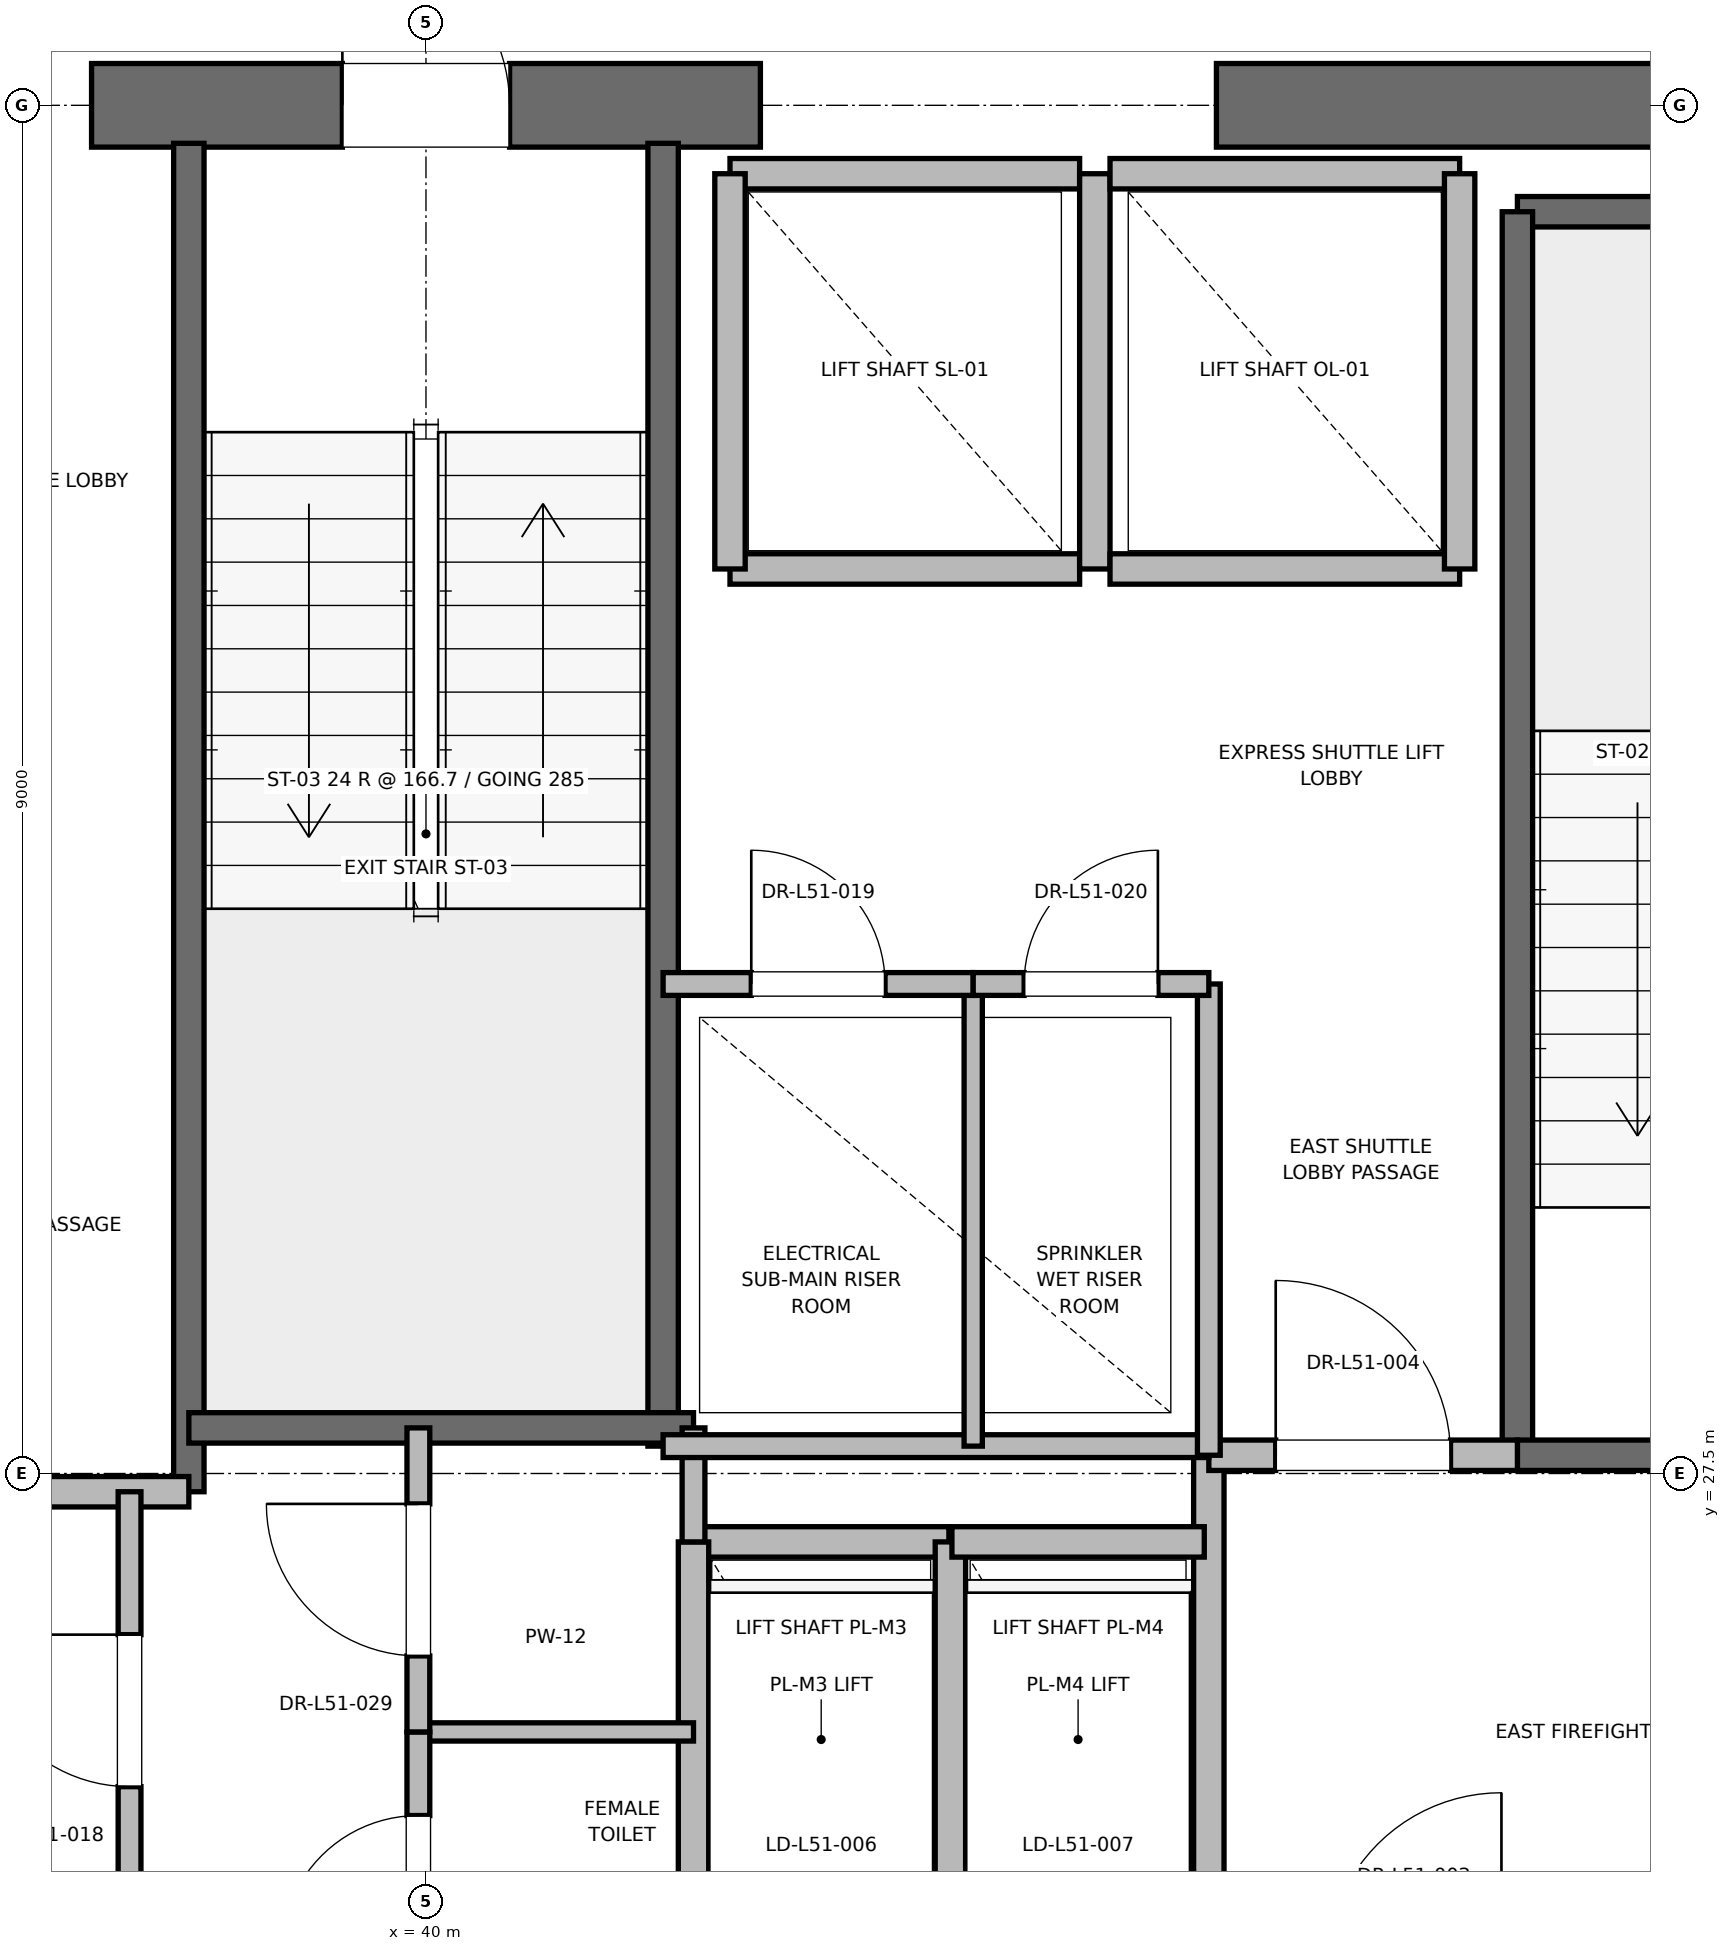
"""IFC4 building model, lengths in metres.
Left out: names, types, materials, properties, quantities, classifications, styles, units other than length and angle.
Written with IfcOpenShell. Run it as: python <this file> out.ifc"""

import sys

from ifc_helpers import new_model, si_unit, direction, frame, frame_2d, origin, place, context, subcontext, project, spatial, rectangle, extrude, element, fill, save


model = new_model("IFC4")
c1 = context("Model", 3, precision=1e-05, world=origin(), true_north=direction((0.0, 1.0)))
c2 = subcontext(c1, "Body", "Model", "MODEL_VIEW")
j1 = project(units=[si_unit("LENGTHUNIT", "METRE"), si_unit("PLANEANGLEUNIT", "RADIAN")], contexts=[c1])
p1 = place(None, origin())
s1 = spatial("IfcSite", under=j1, at=p1, CompositionType="ELEMENT")
p2 = place(p1, origin())
s2 = spatial("IfcBuilding", under=s1, at=p2, CompositionType="ELEMENT")
p3 = place(p2, frame((0.0, 0.0, 221.2)))
s3 = spatial("IfcBuildingStorey", under=s2, at=p3, CompositionType="ELEMENT", Elevation=221.2)
p4 = place(p3, frame((37.8, 36.5, 0.0), z_axis=(0.0, 0.0, 1.0), x_axis=(1.0, 0.0, 0.0)))
e1 = element("IfcWall", 1, at=p4, inside=s3, PredefinedType="SHEAR", context=c2, shape_type="SweptSolid", body=[
    extrude(rectangle(XDim=4.4, YDim=0.55, at=frame_2d((2.2, 0.0))), origin(), (0.0, 0.0, 1.0), 3.775),
])
p5 = place(p4, frame((1.65, 0.0, 0.0)))
e2 = element("IfcOpeningElement", 2, at=p5, cuts=e1, PredefinedType="OPENING", context=c2, shape_type="SweptSolid", body=[
    extrude(rectangle(XDim=1.1, YDim=2.15, at=frame_2d((0.55, 1.075))), frame((0.0, 0.275, 0.0), z_axis=(0.0, -1.0, 0.0), x_axis=(1.0, 0.0, 0.0)), (0.0, 0.0, 1.0), 0.55),
])
p6 = place(p3, frame((45.2, 36.5, 0.0), z_axis=(0.0, 0.0, 1.0), x_axis=(1.0, 0.0, 0.0)))
e3 = element("IfcWall", 3, at=p6, inside=s3, PredefinedType="SHEAR", context=c2, shape_type="SweptSolid", body=[
    extrude(rectangle(XDim=5.8, YDim=0.55, at=frame_2d((2.9, 0.0))), origin(), (0.0, 0.0, 1.0), 3.775),
])
p7 = place(p3, frame((47.18, 35.8, 0.0), z_axis=(0.0, 0.0, 1.0), x_axis=(1.0, 0.0, 0.0)))
e4 = element("IfcWall", 4, at=p7, inside=s3, PredefinedType="SOLIDWALL", context=c2, shape_type="SweptSolid", body=[
    extrude(rectangle(XDim=3.12, YDim=0.2, at=frame_2d((1.56, 0.0))), origin(), (0.0, 0.0, 1.0), 3.775),
])
p8 = place(p3, frame((47.18, 27.62, 0.0), z_axis=(0.0, 0.0, 1.0), x_axis=(0.0, 1.0, 0.0)))
e5 = element("IfcWall", 5, at=p8, inside=s3, PredefinedType="SOLIDWALL", context=c2, shape_type="SweptSolid", body=[
    extrude(rectangle(XDim=8.18, YDim=0.2, at=frame_2d((4.09, 0.0))), origin(), (0.0, 0.0, 1.0), 3.775),
])
p9 = place(p3, frame((47.18, 27.62, 0.0), z_axis=(0.0, 0.0, 1.0), x_axis=(1.0, 0.0, 0.0)))
e6 = element("IfcWall", 6, at=p9, inside=s3, PredefinedType="SOLIDWALL", context=c2, shape_type="SweptSolid", body=[
    extrude(rectangle(XDim=3.12, YDim=0.2, at=frame_2d((1.56, 0.0))), origin(), (0.0, 0.0, 1.0), 3.775),
])
p10 = place(p9, frame((1.01, 0.0, 0.0)))
e7 = element("IfcOpeningElement", 7, at=p10, cuts=e6, PredefinedType="OPENING", context=c2, shape_type="SweptSolid", body=[
    extrude(rectangle(XDim=1.1, YDim=2.15, at=frame_2d((0.55, 1.075))), frame((0.0, 0.1, 0.0), z_axis=(0.0, -1.0, 0.0), x_axis=(1.0, 0.0, 0.0)), (0.0, 0.0, 1.0), 0.2),
])
p11 = place(p3, frame((38.44, 27.38, 0.0), z_axis=(0.0, 0.0, 1.0), x_axis=(0.0, 1.0, 0.0)))
e8 = element("IfcWall", 8, at=p11, inside=s3, PredefinedType="SOLIDWALL", context=c2, shape_type="SweptSolid", body=[
    extrude(rectangle(XDim=8.87, YDim=0.2, at=frame_2d((4.435, 0.0))), origin(), (0.0, 0.0, 1.0), 3.775),
])
p12 = place(p3, frame((41.56, 27.68, 0.0), z_axis=(0.0, 0.0, 1.0), x_axis=(0.0, 1.0, 0.0)))
e9 = element("IfcWall", 9, at=p12, inside=s3, PredefinedType="SOLIDWALL", context=c2, shape_type="SweptSolid", body=[
    extrude(rectangle(XDim=8.57, YDim=0.2, at=frame_2d((4.285, 0.0))), origin(), (0.0, 0.0, 1.0), 3.775),
])
p13 = place(p3, frame((38.44, 27.8, 0.0), z_axis=(0.0, 0.0, 1.0), x_axis=(1.0, 0.0, 0.0)))
e10 = element("IfcWall", 10, at=p13, inside=s3, PredefinedType="SOLIDWALL", context=c2, shape_type="SweptSolid", body=[
    extrude(rectangle(XDim=3.32, YDim=0.2, at=frame_2d((1.66, 0.0))), origin(), (0.0, 0.0, 1.0), 3.775),
])
p14 = place(p3, frame((32.82, 27.38, 0.0), z_axis=(0.0, 0.0, 1.0), x_axis=(1.0, 0.0, 0.0)))
e11 = element("IfcWall", 11, at=p14, inside=s3, PredefinedType="PARTITIONING", context=c2, shape_type="SweptSolid", body=[
    extrude(rectangle(XDim=5.62, YDim=0.2, at=frame_2d((2.81, 0.0))), origin(), (0.0, 0.0, 1.0), 3.775),
])
p15 = place(p3, frame((45.15, 24.25, 0.0), z_axis=(0.0, 0.0, 1.0), x_axis=(0.0, 1.0, 0.0)))
e12 = element("IfcWall", 12, at=p15, inside=s3, PredefinedType="PARTITIONING", context=c2, shape_type="SweptSolid", body=[
    extrude(rectangle(XDim=3.37, YDim=0.2, at=frame_2d((1.685, 0.0))), origin(), (0.0, 0.0, 1.0), 3.775),
])
p16 = place(p3, frame((45.15, 27.62, 0.0), z_axis=(0.0, 0.0, 1.0), x_axis=(1.0, 0.0, 0.0)))
e13 = element("IfcWall", 13, at=p16, inside=s3, PredefinedType="PARTITIONING", context=c2, shape_type="SweptSolid", body=[
    extrude(rectangle(XDim=2.03, YDim=0.2, at=frame_2d((1.015, 0.0))), origin(), (0.0, 0.0, 1.0), 3.775),
])
p17 = place(p16, frame((0.44, 0.0, 0.0)))
e14 = element("IfcOpeningElement", 14, at=p17, cuts=e13, PredefinedType="OPENING", context=c2, shape_type="SweptSolid", body=[
    extrude(rectangle(XDim=1.15, YDim=2.2, at=frame_2d((0.575, 1.1))), frame((0.0, 0.1, 0.0), z_axis=(0.0, -1.0, 0.0), x_axis=(1.0, 0.0, 0.0)), (0.0, 0.0, 1.0), 0.2),
])
p18 = place(p3, frame((43.44, 27.05, 0.0), z_axis=(0.0, 0.0, 1.0), x_axis=(-1.0, 0.0, 0.0)))
e15 = element("IfcWall", 15, at=p18, inside=s3, PredefinedType="SOLIDWALL", context=c2, shape_type="SweptSolid", body=[
    extrude(rectangle(XDim=1.68, YDim=0.2, at=frame_2d((0.84, 0.0))), origin(), (0.0, 0.0, 1.0), 3.775),
])
for number, where, z_axis, x_axis in (
    (16, (41.76, 27.05, 0.0), (0.0, 0.0, 1.0), (0.0, -1.0, 0.0)),
    (17, (43.45, 24.45, 0.0), (0.0, 0.0, 1.0), (0.0, 1.0, 0.0)),
):
    element("IfcWall", number, at=place(p3, frame(where, z_axis=z_axis, x_axis=x_axis)), inside=s3, PredefinedType="SOLIDWALL", context=c2, shape_type="SweptSolid", body=[
        extrude(rectangle(XDim=2.6, YDim=0.2, at=frame_2d((1.3, 0.0))), origin(), (0.0, 0.0, 1.0), 3.775),
    ])
p19 = place(p3, frame((45.12, 27.05, 0.0), z_axis=(0.0, 0.0, 1.0), x_axis=(-1.0, 0.0, 0.0)))
e18 = element("IfcWall", 18, at=p19, inside=s3, PredefinedType="SOLIDWALL", context=c2, shape_type="SweptSolid", body=[
    extrude(rectangle(XDim=1.66, YDim=0.2, at=frame_2d((0.83, 0.0))), origin(), (0.0, 0.0, 1.0), 3.775),
])
p20 = place(p3, frame((42.0, 33.45, 0.0), z_axis=(0.0, 0.0, 1.0), x_axis=(1.0, 0.0, 0.0)))
e19 = element("IfcWall", 19, at=p20, inside=s3, PredefinedType="SOLIDWALL", context=c2, shape_type="SweptSolid", body=[
    extrude(rectangle(XDim=2.3, YDim=0.2, at=frame_2d((1.15, 0.0))), origin(), (0.0, 0.0, 1.0), 3.775),
])
p21 = place(p3, frame((44.3, 36.05, 0.0), z_axis=(0.0, 0.0, 1.0), x_axis=(-1.0, 0.0, 0.0)))
e20 = element("IfcWall", 20, at=p21, inside=s3, PredefinedType="SOLIDWALL", context=c2, shape_type="SweptSolid", body=[
    extrude(rectangle(XDim=2.3, YDim=0.2, at=frame_2d((1.15, 0.0))), origin(), (0.0, 0.0, 1.0), 2.755),
])
for number, where, z_axis, x_axis in (
    (21, (42.0, 36.05, 0.0), (0.0, 0.0, 1.0), (0.0, -1.0, 0.0)),
    (22, (44.4, 33.45, 0.0), (0.0, 0.0, 1.0), (0.0, 1.0, 0.0)),
):
    element("IfcWall", number, at=place(p3, frame(where, z_axis=z_axis, x_axis=x_axis)), inside=s3, PredefinedType="SOLIDWALL", context=c2, shape_type="SweptSolid", body=[
        extrude(rectangle(XDim=2.6, YDim=0.2, at=frame_2d((1.3, 0.0))), origin(), (0.0, 0.0, 1.0), 2.755),
    ])
p22 = place(p3, frame((44.5, 33.45, 0.0), z_axis=(0.0, 0.0, 1.0), x_axis=(1.0, 0.0, 0.0)))
e23 = element("IfcWall", 23, at=p22, inside=s3, PredefinedType="SOLIDWALL", context=c2, shape_type="SweptSolid", body=[
    extrude(rectangle(XDim=2.3, YDim=0.2, at=frame_2d((1.15, 0.0))), origin(), (0.0, 0.0, 1.0), 3.775),
])
p23 = place(p3, frame((46.8, 36.05, 0.0), z_axis=(0.0, 0.0, 1.0), x_axis=(-1.0, 0.0, 0.0)))
e24 = element("IfcWall", 24, at=p23, inside=s3, PredefinedType="SOLIDWALL", context=c2, shape_type="SweptSolid", body=[
    extrude(rectangle(XDim=2.3, YDim=0.2, at=frame_2d((1.15, 0.0))), origin(), (0.0, 0.0, 1.0), 2.755),
])
p24 = place(p3, frame((46.8, 33.45, 0.0), z_axis=(0.0, 0.0, 1.0), x_axis=(0.0, 1.0, 0.0)))
e25 = element("IfcWall", 25, at=p24, inside=s3, PredefinedType="SOLIDWALL", context=c2, shape_type="SweptSolid", body=[
    extrude(rectangle(XDim=2.6, YDim=0.2, at=frame_2d((1.3, 0.0))), origin(), (0.0, 0.0, 1.0), 3.775),
])
p25 = place(p3, frame((39.95, 25.8, 0.0), z_axis=(0.0, 0.0, 1.0), x_axis=(1.0, 0.0, 0.0)))
e26 = element("IfcWall", 26, at=p25, inside=s3, PredefinedType="PARTITIONING", context=c2, shape_type="SweptSolid", body=[
    extrude(rectangle(XDim=1.81, YDim=0.12, at=frame_2d((0.905, 0.0))), origin(), (0.0, 0.0, 1.0), 2.85),
])
p26 = place(p3, frame((41.76, 27.05, 0.0), z_axis=(0.0, 0.0, 1.0), x_axis=(0.0, 1.0, 0.0)))
e27 = element("IfcWall", 27, at=p26, inside=s3, PredefinedType="PARTITIONING", context=c2, shape_type="SweptSolid", body=[
    extrude(rectangle(XDim=0.75, YDim=0.15, at=frame_2d((0.375, 0.0))), origin(), (0.0, 0.0, 1.0), 2.85),
])
p27 = place(p3, frame((39.95, 23.8, 0.0), z_axis=(0.0, 0.0, 1.0), x_axis=(0.0, 1.0, 0.0)))
e28 = element("IfcWall", 28, at=p27, inside=s3, PredefinedType="PARTITIONING", context=c2, shape_type="SweptSolid", body=[
    extrude(rectangle(XDim=2.0, YDim=0.15, at=frame_2d((1.0, 0.0))), origin(), (0.0, 0.0, 1.0), 2.85),
])
p28 = place(p27, frame((0.55, 0.0, 0.0)))
e29 = element("IfcOpeningElement", 29, at=p28, cuts=e28, PredefinedType="OPENING", context=c2, shape_type="SweptSolid", body=[
    extrude(rectangle(XDim=0.9, YDim=2.1, at=frame_2d((0.45, 1.05))), frame((0.0, 0.075, 0.0), z_axis=(0.0, -1.0, 0.0), x_axis=(1.0, 0.0, 0.0)), (0.0, 0.0, 1.0), 0.15),
])
p29 = place(p3, frame((39.95, 25.8, 0.0), z_axis=(0.0, 0.0, 1.0), x_axis=(0.0, 1.0, 0.0)))
e30 = element("IfcWall", 30, at=p29, inside=s3, PredefinedType="PARTITIONING", context=c2, shape_type="SweptSolid", body=[
    extrude(rectangle(XDim=2.0, YDim=0.15, at=frame_2d((1.0, 0.0))), origin(), (0.0, 0.0, 1.0), 2.85),
])
p30 = place(p29, frame((0.5, 0.0, 0.0)))
e31 = element("IfcOpeningElement", 31, at=p30, cuts=e30, PredefinedType="OPENING", context=c2, shape_type="SweptSolid", body=[
    extrude(rectangle(XDim=1.0, YDim=2.15, at=frame_2d((0.5, 1.075))), frame((0.0, 0.075, 0.0), z_axis=(0.0, -1.0, 0.0), x_axis=(1.0, 0.0, 0.0)), (0.0, 0.0, 1.0), 0.15),
])
p31 = place(p3, frame((38.05, 24.5, 0.0), z_axis=(0.0, 0.0, 1.0), x_axis=(0.0, 1.0, 0.0)))
e32 = element("IfcWall", 32, at=p31, inside=s3, PredefinedType="PARTITIONING", context=c2, shape_type="SweptSolid", body=[
    extrude(rectangle(XDim=2.88, YDim=0.15, at=frame_2d((1.44, 0.0))), origin(), (0.0, 0.0, 1.0), 2.85),
])
p32 = place(p31, frame((0.94, 0.0, 0.0)))
e33 = element("IfcOpeningElement", 33, at=p32, cuts=e32, PredefinedType="OPENING", context=c2, shape_type="SweptSolid", body=[
    extrude(rectangle(XDim=1.0, YDim=2.15, at=frame_2d((0.5, 1.075))), frame((0.0, 0.075, 0.0), z_axis=(0.0, -1.0, 0.0), x_axis=(1.0, 0.0, 0.0)), (0.0, 0.0, 1.0), 0.15),
])
p33 = place(p3, frame((41.56, 27.68, 0.0), z_axis=(0.0, 0.0, 1.0), x_axis=(1.0, 0.0, 0.0)))
e34 = element("IfcWall", 34, at=p33, inside=s3, PredefinedType="PARTITIONING", context=c2, shape_type="SweptSolid", body=[
    extrude(rectangle(XDim=3.59, YDim=0.15, at=frame_2d((1.795, 0.0))), origin(), (0.0, 0.0, 1.0), 2.85),
])
p34 = place(p3, frame((45.15, 27.62, 0.0), z_axis=(0.0, 0.0, 1.0), x_axis=(0.0, 1.0, 0.0)))
e35 = element("IfcWall", 35, at=p34, inside=s3, PredefinedType="PARTITIONING", context=c2, shape_type="SweptSolid", body=[
    extrude(rectangle(XDim=3.1, YDim=0.15, at=frame_2d((1.55, 0.0))), origin(), (0.0, 0.0, 1.0), 2.85),
])
p35 = place(p3, frame((43.6, 27.68, 0.0), z_axis=(0.0, 0.0, 1.0), x_axis=(0.0, 1.0, 0.0)))
e36 = element("IfcWall", 36, at=p35, inside=s3, PredefinedType="PARTITIONING", context=c2, shape_type="SweptSolid", body=[
    extrude(rectangle(XDim=3.04, YDim=0.12, at=frame_2d((1.52, 0.0))), origin(), (0.0, 0.0, 1.0), 2.85),
])
p36 = place(p3, frame((41.56, 30.72, 0.0), z_axis=(0.0, 0.0, 1.0), x_axis=(1.0, 0.0, 0.0)))
e37 = element("IfcWall", 37, at=p36, inside=s3, PredefinedType="PARTITIONING", context=c2, shape_type="SweptSolid", body=[
    extrude(rectangle(XDim=2.04, YDim=0.15, at=frame_2d((1.02, 0.0))), origin(), (0.0, 0.0, 1.0), 2.85),
])
p37 = place(p36, frame((0.58, 0.0, 0.0)))
e38 = element("IfcOpeningElement", 38, at=p37, cuts=e37, PredefinedType="OPENING", context=c2, shape_type="SweptSolid", body=[
    extrude(rectangle(XDim=0.88, YDim=2.1, at=frame_2d((0.44, 1.05))), frame((0.0, 0.075, 0.0), z_axis=(0.0, -1.0, 0.0), x_axis=(1.0, 0.0, 0.0)), (0.0, 0.0, 1.0), 0.15),
])
p38 = place(p3, frame((43.6, 30.72, 0.0), z_axis=(0.0, 0.0, 1.0), x_axis=(1.0, 0.0, 0.0)))
e39 = element("IfcWall", 39, at=p38, inside=s3, PredefinedType="PARTITIONING", context=c2, shape_type="SweptSolid", body=[
    extrude(rectangle(XDim=1.55, YDim=0.15, at=frame_2d((0.775, 0.0))), origin(), (0.0, 0.0, 1.0), 2.85),
])
p39 = place(p38, frame((0.335, 0.0, 0.0)))
e40 = element("IfcOpeningElement", 40, at=p39, cuts=e39, PredefinedType="OPENING", context=c2, shape_type="SweptSolid", body=[
    extrude(rectangle(XDim=0.88, YDim=2.1, at=frame_2d((0.44, 1.05))), frame((0.0, 0.075, 0.0), z_axis=(0.0, -1.0, 0.0), x_axis=(1.0, 0.0, 0.0)), (0.0, 0.0, 1.0), 0.15),
])
p40 = place(p5, origin())
e41 = element("IfcDoor", 41, at=p40, inside=s3, OperationType="SINGLE_SWING_LEFT", PredefinedType="DOOR", context=c2, shape_type="SweptSolid", body=[
    extrude(rectangle(XDim=1.1, YDim=2.15, at=frame_2d((0.55, 1.075))), frame((0.0, 0.025, 0.0), z_axis=(0.0, -1.0, 0.0), x_axis=(1.0, 0.0, 0.0)), (0.0, 0.0, 1.0), 0.05),
])
fill(e2, e41)
p41 = place(p17, origin())
e42 = element("IfcDoor", 42, at=p41, inside=s3, OperationType="SINGLE_SWING_LEFT", PredefinedType="DOOR", context=c2, shape_type="SweptSolid", body=[
    extrude(rectangle(XDim=1.15, YDim=2.2, at=frame_2d((0.575, 1.1))), frame((0.0, 0.025, 0.0), z_axis=(0.0, -1.0, 0.0), x_axis=(1.0, 0.0, 0.0)), (0.0, 0.0, 1.0), 0.05),
])
fill(e14, e42)
p42 = place(p28, origin())
e43 = element("IfcDoor", 43, at=p42, inside=s3, OperationType="SINGLE_SWING_LEFT", PredefinedType="DOOR", context=c2, shape_type="SweptSolid", body=[
    extrude(rectangle(XDim=0.9, YDim=2.1, at=frame_2d((0.45, 1.05))), frame((0.0, 0.025, 0.0), z_axis=(0.0, -1.0, 0.0), x_axis=(1.0, 0.0, 0.0)), (0.0, 0.0, 1.0), 0.05),
])
fill(e29, e43)
p43 = place(p30, origin())
e44 = element("IfcDoor", 44, at=p43, inside=s3, OperationType="SINGLE_SWING_RIGHT", PredefinedType="DOOR", context=c2, shape_type="SweptSolid", body=[
    extrude(rectangle(XDim=1.0, YDim=2.15, at=frame_2d((0.5, 1.075))), frame((0.0, 0.025, 0.0), z_axis=(0.0, -1.0, 0.0), x_axis=(1.0, 0.0, 0.0)), (0.0, 0.0, 1.0), 0.05),
])
fill(e31, e44)
p44 = place(p32, origin())
e45 = element("IfcDoor", 45, at=p44, inside=s3, OperationType="SINGLE_SWING_RIGHT", PredefinedType="DOOR", context=c2, shape_type="SweptSolid", body=[
    extrude(rectangle(XDim=1.0, YDim=2.15, at=frame_2d((0.5, 1.075))), frame((0.0, 0.025, 0.0), z_axis=(0.0, -1.0, 0.0), x_axis=(1.0, 0.0, 0.0)), (0.0, 0.0, 1.0), 0.05),
])
fill(e33, e45)
p45 = place(p37, origin())
e46 = element("IfcDoor", 46, at=p45, inside=s3, OperationType="SINGLE_SWING_LEFT", PredefinedType="DOOR", context=c2, shape_type="SweptSolid", body=[
    extrude(rectangle(XDim=0.88, YDim=2.1, at=frame_2d((0.44, 1.05))), frame((0.0, 0.025, 0.0), z_axis=(0.0, -1.0, 0.0), x_axis=(1.0, 0.0, 0.0)), (0.0, 0.0, 1.0), 0.05),
])
fill(e38, e46)
p46 = place(p39, origin())
e47 = element("IfcDoor", 47, at=p46, inside=s3, OperationType="SINGLE_SWING_RIGHT", PredefinedType="DOOR", context=c2, shape_type="SweptSolid", body=[
    extrude(rectangle(XDim=0.88, YDim=2.1, at=frame_2d((0.44, 1.05))), frame((0.0, 0.025, 0.0), z_axis=(0.0, -1.0, 0.0), x_axis=(1.0, 0.0, 0.0)), (0.0, 0.0, 1.0), 0.05),
])
fill(e40, e47)
save(model, sys.argv[1])
